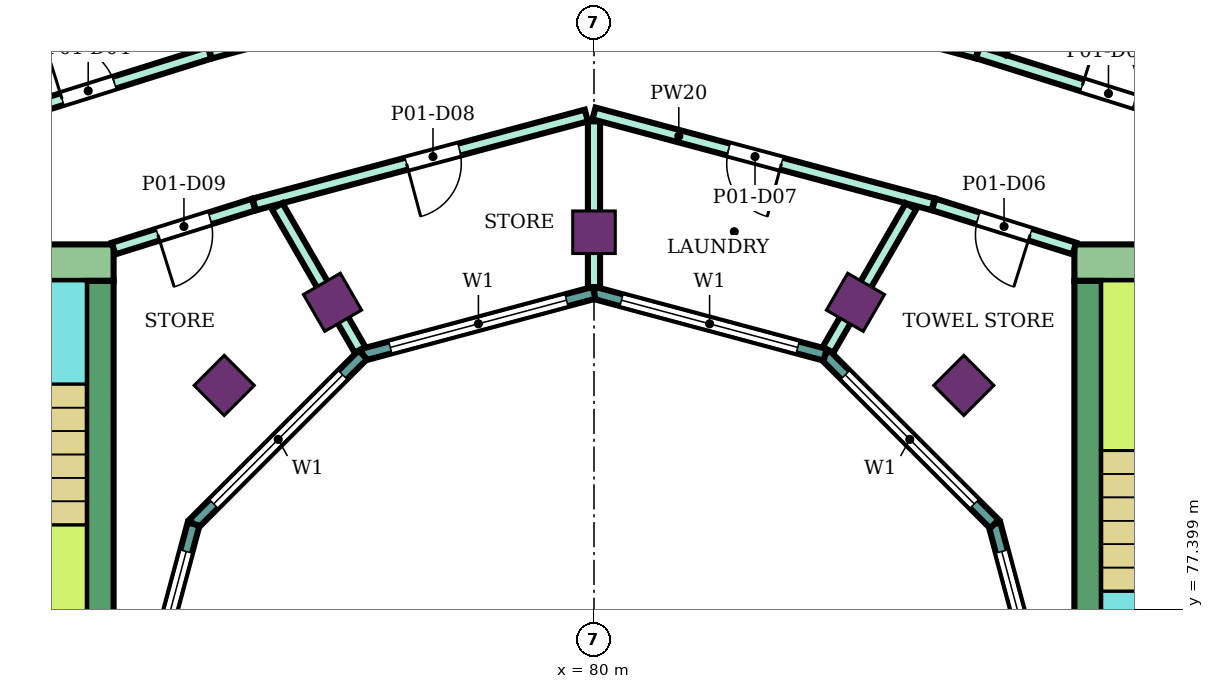
"""IFC4 building model, lengths in metres.
Left out: names, types, materials, properties, quantities, classifications, styles, units other than length and angle.
Written with IfcOpenShell. Run it as: python <this file> out.ifc"""

import sys

from ifc_helpers import new_model, si_unit, direction, frame, frame_2d, origin, origin_2d, place, context, subcontext, project, spatial, rectangle, extrude, element, fill, save


model = new_model("IFC4")
c1 = context("Model", 3, precision=1e-05, world=origin(), true_north=direction((0.0, 1.0)))
c2 = subcontext(c1, "Body", "Model", "MODEL_VIEW")
j1 = project(units=[si_unit("LENGTHUNIT", "METRE"), si_unit("PLANEANGLEUNIT", "RADIAN")], contexts=[c1])
p1 = place(None, origin())
s1 = spatial("IfcSite", under=j1, at=p1, CompositionType="ELEMENT")
p2 = place(p1, origin())
s2 = spatial("IfcBuilding", under=s1, at=p2, CompositionType="ELEMENT")
p3 = place(p2, frame((0.0, 0.0, 270.9)))
s3 = spatial("IfcBuildingStorey", under=s2, at=p3, CompositionType="ELEMENT", Elevation=270.9)
for number, where, z_axis, x_axis in (
    (1, (86.081, 81.081, 0.0), (0.0, 0.0, 1.0), (0.707, 0.707, 0.0)),
    (2, (84.3, 82.448, 0.0), (0.0, 0.0, 1.0), (0.5, 0.866, 0.0)),
    (3, (80.0, 83.6, 0.0), (0.0, 0.0, 1.0), (0.0, 1.0, 0.0)),
    (4, (75.7, 82.448, 0.0), (0.0, 0.0, 1.0), (-0.5, 0.866, 0.0)),
    (5, (73.919, 81.081, 0.0), (0.0, 0.0, 1.0), (-0.707, 0.707, 0.0)),
):
    element("IfcColumn", number, at=place(p3, frame(where, z_axis=z_axis, x_axis=x_axis)), inside=s3, PredefinedType="COLUMN", context=c2, shape_type="SweptSolid", body=[
        extrude(rectangle(XDim=0.7, YDim=0.7, at=origin_2d()), origin(), (0.0, 0.0, 1.0), 4.8),
    ])
p4 = place(p3, frame((87.9, 83.1, 0.0), z_axis=(0.0, 0.0, 1.0), x_axis=(1.0, 0.0, 0.0)))
e6 = element("IfcWall", 6, at=p4, inside=s3, PredefinedType="SHEAR", context=c2, shape_type="SweptSolid", body=[
    extrude(rectangle(XDim=14.9, YDim=0.6, at=frame_2d((7.45, 0.0))), origin(), (0.0, 0.0, 1.0), 4.48),
])
p5 = place(p4, frame((4.2, 0.0, 0.0)))
e7 = element("IfcOpeningElement", 7, at=p5, cuts=e6, PredefinedType="OPENING", context=c2, shape_type="SweptSolid", body=[
    extrude(rectangle(XDim=2.4, YDim=2.4, at=frame_2d((1.2, 1.2))), frame((0.0, 0.31, 0.0), z_axis=(0.0, -1.0, 0.0), x_axis=(1.0, 0.0, 0.0)), (0.0, 0.0, 1.0), 0.62),
])
p6 = place(p3, frame((88.125, 75.0, 0.0), z_axis=(0.0, 0.0, 1.0), x_axis=(0.0, 1.0, 0.0)))
e8 = element("IfcWall", 8, at=p6, inside=s3, PredefinedType="SHEAR", context=c2, shape_type="SweptSolid", body=[
    extrude(rectangle(XDim=7.8, YDim=0.45, at=frame_2d((3.9, 0.0))), origin(), (0.0, 0.0, 1.0), 4.48),
])
p7 = place(p3, frame((72.1, 83.1, 0.0), z_axis=(0.0, 0.0, 1.0), x_axis=(-1.0, 0.0, 0.0)))
e9 = element("IfcWall", 9, at=p7, inside=s3, PredefinedType="SHEAR", context=c2, shape_type="SweptSolid", body=[
    extrude(rectangle(XDim=14.9, YDim=0.6, at=frame_2d((7.45, 0.0))), origin(), (0.0, 0.0, 1.0), 4.48),
])
p8 = place(p7, frame((4.2, 0.0, 0.0)))
e10 = element("IfcOpeningElement", 10, at=p8, cuts=e9, PredefinedType="OPENING", context=c2, shape_type="SweptSolid", body=[
    extrude(rectangle(XDim=2.4, YDim=2.4, at=frame_2d((1.2, 1.2))), frame((0.0, 0.31, 0.0), z_axis=(0.0, -1.0, 0.0), x_axis=(1.0, 0.0, 0.0)), (0.0, 0.0, 1.0), 0.62),
])
p9 = place(p3, frame((71.875, 82.8, 0.0), z_axis=(0.0, 0.0, 1.0), x_axis=(0.0, -1.0, 0.0)))
e11 = element("IfcWall", 11, at=p9, inside=s3, PredefinedType="SHEAR", context=c2, shape_type="SweptSolid", body=[
    extrude(rectangle(XDim=7.8, YDim=0.45, at=frame_2d((3.9, 0.0))), origin(), (0.0, 0.0, 1.0), 4.48),
])
p10 = place(p3, frame((87.604, 75.0, 0.0), z_axis=(0.0, 0.0, 1.0), x_axis=(-0.258789828301, 0.965933654434, 0.0)))
e12 = element("IfcWall", 12, at=p10, inside=s3, PredefinedType="NOTDEFINED", context=c2, shape_type="SweptSolid", body=[
    extrude(rectangle(XDim=3.936, YDim=0.2, at=frame_2d((1.968, 0.0))), origin(), (0.0, 0.0, 1.0), 4.8),
])
p11 = place(p10, frame((0.468, 0.0, 0.9)))
e13 = element("IfcOpeningElement", 13, at=p11, cuts=e12, PredefinedType="OPENING", context=c2, shape_type="SweptSolid", body=[
    extrude(rectangle(XDim=3.0, YDim=2.3, at=frame_2d((1.5, 1.15))), frame((0.0, 0.11, 0.0), z_axis=(0.0, -1.0, 0.0), x_axis=(1.0, 0.0, 0.0)), (0.0, 0.0, 1.0), 0.22),
])
p12 = place(p3, frame((86.585, 78.802, 0.0), z_axis=(0.0, 0.0, 1.0), x_axis=(-0.707106781187, 0.707106781187, 0.0)))
e14 = element("IfcWall", 14, at=p12, inside=s3, PredefinedType="NOTDEFINED", context=c2, shape_type="SweptSolid", body=[
    extrude(rectangle(XDim=3.936, YDim=0.2, at=frame_2d((1.968, 0.0))), origin(), (0.0, 0.0, 1.0), 4.8),
])
p13 = place(p12, frame((0.468, 0.0, 0.9)))
e15 = element("IfcOpeningElement", 15, at=p13, cuts=e14, PredefinedType="OPENING", context=c2, shape_type="SweptSolid", body=[
    extrude(rectangle(XDim=3.0, YDim=2.3, at=frame_2d((1.5, 1.15))), frame((0.0, 0.11, 0.0), z_axis=(0.0, -1.0, 0.0), x_axis=(1.0, 0.0, 0.0)), (0.0, 0.0, 1.0), 0.22),
])
p14 = place(p3, frame((83.802, 81.585, 0.0), z_axis=(0.0, 0.0, 1.0), x_axis=(-0.965933654434, 0.258789828301, 0.0)))
e16 = element("IfcWall", 16, at=p14, inside=s3, PredefinedType="NOTDEFINED", context=c2, shape_type="SweptSolid", body=[
    extrude(rectangle(XDim=3.936, YDim=0.2, at=frame_2d((1.968, 0.0))), origin(), (0.0, 0.0, 1.0), 4.8),
])
p15 = place(p14, frame((0.468, 0.0, 0.9)))
e17 = element("IfcOpeningElement", 17, at=p15, cuts=e16, PredefinedType="OPENING", context=c2, shape_type="SweptSolid", body=[
    extrude(rectangle(XDim=3.0, YDim=2.3, at=frame_2d((1.5, 1.15))), frame((0.0, 0.11, 0.0), z_axis=(0.0, -1.0, 0.0), x_axis=(1.0, 0.0, 0.0)), (0.0, 0.0, 1.0), 0.22),
])
p16 = place(p3, frame((80.0, 82.604, 0.0), z_axis=(0.0, 0.0, 1.0), x_axis=(-0.965933654434, -0.258789828301, 0.0)))
e18 = element("IfcWall", 18, at=p16, inside=s3, PredefinedType="NOTDEFINED", context=c2, shape_type="SweptSolid", body=[
    extrude(rectangle(XDim=3.936, YDim=0.2, at=frame_2d((1.968, 0.0))), origin(), (0.0, 0.0, 1.0), 4.8),
])
p17 = place(p16, frame((0.468, 0.0, 0.9)))
e19 = element("IfcOpeningElement", 19, at=p17, cuts=e18, PredefinedType="OPENING", context=c2, shape_type="SweptSolid", body=[
    extrude(rectangle(XDim=3.0, YDim=2.3, at=frame_2d((1.5, 1.15))), frame((0.0, 0.11, 0.0), z_axis=(0.0, -1.0, 0.0), x_axis=(1.0, 0.0, 0.0)), (0.0, 0.0, 1.0), 0.22),
])
p18 = place(p3, frame((76.198, 81.585, 0.0), z_axis=(0.0, 0.0, 1.0), x_axis=(-0.707106781187, -0.707106781187, 0.0)))
e20 = element("IfcWall", 20, at=p18, inside=s3, PredefinedType="NOTDEFINED", context=c2, shape_type="SweptSolid", body=[
    extrude(rectangle(XDim=3.936, YDim=0.2, at=frame_2d((1.968, 0.0))), origin(), (0.0, 0.0, 1.0), 4.8),
])
p19 = place(p18, frame((0.468, 0.0, 0.9)))
e21 = element("IfcOpeningElement", 21, at=p19, cuts=e20, PredefinedType="OPENING", context=c2, shape_type="SweptSolid", body=[
    extrude(rectangle(XDim=3.0, YDim=2.3, at=frame_2d((1.5, 1.15))), frame((0.0, 0.11, 0.0), z_axis=(0.0, -1.0, 0.0), x_axis=(1.0, 0.0, 0.0)), (0.0, 0.0, 1.0), 0.22),
])
p20 = place(p3, frame((73.415, 78.802, 0.0), z_axis=(0.0, 0.0, 1.0), x_axis=(-0.258789828301, -0.965933654434, 0.0)))
e22 = element("IfcWall", 22, at=p20, inside=s3, PredefinedType="NOTDEFINED", context=c2, shape_type="SweptSolid", body=[
    extrude(rectangle(XDim=3.936, YDim=0.2, at=frame_2d((1.968, 0.0))), origin(), (0.0, 0.0, 1.0), 4.8),
])
p21 = place(p20, frame((0.468, 0.0, 0.9)))
e23 = element("IfcOpeningElement", 23, at=p21, cuts=e22, PredefinedType="OPENING", context=c2, shape_type="SweptSolid", body=[
    extrude(rectangle(XDim=3.0, YDim=2.3, at=frame_2d((1.5, 1.15))), frame((0.0, 0.11, 0.0), z_axis=(0.0, -1.0, 0.0), x_axis=(1.0, 0.0, 0.0)), (0.0, 0.0, 1.0), 0.22),
])
p22 = place(p3, frame((68.201, 84.833, 0.0), z_axis=(0.0, 0.0, 1.0), x_axis=(0.95420102455, 0.299166182492, 0.0)))
e24 = element("IfcWall", 24, at=p22, inside=s3, PredefinedType="PARTITIONING", context=c2, shape_type="SweptSolid", body=[
    extrude(rectangle(XDim=5.74, YDim=0.2, at=frame_2d((2.87, 0.0))), origin(), (0.0, 0.0, 1.0), 4.35),
])
p23 = place(p22, frame((3.198, 0.0, 0.0)))
e25 = element("IfcOpeningElement", 25, at=p23, cuts=e24, PredefinedType="OPENING", context=c2, shape_type="SweptSolid", body=[
    extrude(rectangle(XDim=0.9, YDim=2.1, at=frame_2d((0.45, 1.05))), frame((0.0, 0.11, 0.0), z_axis=(0.0, -1.0, 0.0), x_axis=(1.0, 0.0, 0.0)), (0.0, 0.0, 1.0), 0.22),
])
p24 = place(p3, frame((72.1, 83.332, 0.0), z_axis=(0.0, 0.0, 1.0), x_axis=(0.954233106619, 0.299063836383, 0.0)))
e26 = element("IfcWall", 26, at=p24, inside=s3, PredefinedType="PARTITIONING", context=c2, shape_type="SweptSolid", body=[
    extrude(rectangle(XDim=2.414, YDim=0.2, at=frame_2d((1.207, 0.0))), origin(), (0.0, 0.0, 1.0), 4.35),
])
p25 = place(p24, frame((0.762, 0.0, 0.0)))
e27 = element("IfcOpeningElement", 27, at=p25, cuts=e26, PredefinedType="OPENING", context=c2, shape_type="SweptSolid", body=[
    extrude(rectangle(XDim=0.9, YDim=2.1, at=frame_2d((0.45, 1.05))), frame((0.0, 0.11, 0.0), z_axis=(0.0, -1.0, 0.0), x_axis=(1.0, 0.0, 0.0)), (0.0, 0.0, 1.0), 0.22),
])
p26 = place(p3, frame((73.687, 86.554, 0.0), z_axis=(0.0, 0.0, 1.0), x_axis=(0.965933770452, 0.258789395263, 0.0)))
e28 = element("IfcWall", 28, at=p26, inside=s3, PredefinedType="PARTITIONING", context=c2, shape_type="SweptSolid", body=[
    extrude(rectangle(XDim=6.486, YDim=0.2, at=frame_2d((3.243, 0.0))), origin(), (0.0, 0.0, 1.0), 4.35),
])
p27 = place(p3, frame((74.413, 84.057, 0.0), z_axis=(0.0, 0.0, 1.0), x_axis=(0.965972135939, 0.258646153246, 0.0)))
e29 = element("IfcWall", 29, at=p27, inside=s3, PredefinedType="PARTITIONING", context=c2, shape_type="SweptSolid", body=[
    extrude(rectangle(XDim=5.654, YDim=0.2, at=frame_2d((2.827, 0.0))), origin(), (0.0, 0.0, 1.0), 4.35),
])
p28 = place(p27, frame((2.593, 0.0, 0.0)))
e30 = element("IfcOpeningElement", 30, at=p28, cuts=e29, PredefinedType="OPENING", context=c2, shape_type="SweptSolid", body=[
    extrude(rectangle(XDim=0.9, YDim=2.1, at=frame_2d((0.45, 1.05))), frame((0.0, 0.11, 0.0), z_axis=(0.0, -1.0, 0.0), x_axis=(1.0, 0.0, 0.0)), (0.0, 0.0, 1.0), 0.22),
])
p29 = place(p3, frame((74.79, 84.028, 0.0), z_axis=(0.0, 0.0, 1.0), x_axis=(0.499905962189, -0.866079689733, 0.0)))
e31 = element("IfcWall", 31, at=p29, inside=s3, PredefinedType="PARTITIONING", context=c2, shape_type="SweptSolid", body=[
    extrude(rectangle(XDim=2.726, YDim=0.2, at=frame_2d((1.363, 0.0))), origin(), (0.0, 0.0, 1.0), 4.35),
])
p30 = place(p3, frame((80.0, 82.699, 0.0), z_axis=(0.0, 0.0, 1.0), x_axis=(0.0, 1.0, 0.0)))
e32 = element("IfcWall", 32, at=p30, inside=s3, PredefinedType="PARTITIONING", context=c2, shape_type="SweptSolid", body=[
    extrude(rectangle(XDim=2.725, YDim=0.2, at=frame_2d((1.363, 0.0))), origin(), (0.0, 0.0, 1.0), 4.35),
])
p31 = place(p3, frame((80.0, 85.554, 0.0), z_axis=(0.0, 0.0, 1.0), x_axis=(0.965928989968, -0.258807237802, 0.0)))
e33 = element("IfcWall", 33, at=p31, inside=s3, PredefinedType="PARTITIONING", context=c2, shape_type="SweptSolid", body=[
    extrude(rectangle(XDim=5.774, YDim=0.2, at=frame_2d((2.887, 0.0))), origin(), (0.0, 0.0, 1.0), 4.35),
])
p32 = place(p31, frame((2.292, 0.0, 0.0)))
e34 = element("IfcOpeningElement", 34, at=p32, cuts=e33, PredefinedType="OPENING", context=c2, shape_type="SweptSolid", body=[
    extrude(rectangle(XDim=0.9, YDim=2.1, at=frame_2d((0.45, 1.05))), frame((0.0, 0.11, 0.0), z_axis=(0.0, -1.0, 0.0), x_axis=(1.0, 0.0, 0.0)), (0.0, 0.0, 1.0), 0.22),
])
p33 = place(p3, frame((80.0, 88.246, 0.0), z_axis=(0.0, 0.0, 1.0), x_axis=(0.965856994925, -0.259075790752, 0.0)))
e35 = element("IfcWall", 35, at=p33, inside=s3, PredefinedType="PARTITIONING", context=c2, shape_type="SweptSolid", body=[
    extrude(rectangle(XDim=6.526, YDim=0.2, at=frame_2d((3.263, 0.0))), origin(), (0.0, 0.0, 1.0), 4.35),
])
p34 = place(p33, frame((2.368, 0.0, 0.0)))
e36 = element("IfcOpeningElement", 36, at=p34, cuts=e35, PredefinedType="OPENING", context=c2, shape_type="SweptSolid", body=[
    extrude(rectangle(XDim=1.8, YDim=2.1, at=frame_2d((0.9, 1.05))), frame((0.0, 0.11, 0.0), z_axis=(0.0, -1.0, 0.0), x_axis=(1.0, 0.0, 0.0)), (0.0, 0.0, 1.0), 0.22),
])
p35 = place(p3, frame((83.85, 81.667, 0.0), z_axis=(0.0, 0.0, 1.0), x_axis=(0.500079107518, 0.86597972622, 0.0)))
e37 = element("IfcWall", 37, at=p35, inside=s3, PredefinedType="PARTITIONING", context=c2, shape_type="SweptSolid", body=[
    extrude(rectangle(XDim=2.726, YDim=0.2, at=frame_2d((1.363, 0.0))), origin(), (0.0, 0.0, 1.0), 4.35),
])
p36 = place(p3, frame((85.587, 84.057, 0.0), z_axis=(0.0, 0.0, 1.0), x_axis=(0.954239513179, -0.299043393987, 0.0)))
e38 = element("IfcWall", 38, at=p36, inside=s3, PredefinedType="PARTITIONING", context=c2, shape_type="SweptSolid", body=[
    extrude(rectangle(XDim=2.424, YDim=0.2, at=frame_2d((1.212, 0.0))), origin(), (0.0, 0.0, 1.0), 4.35),
])
p37 = place(p36, frame((0.762, 0.0, 0.0)))
e39 = element("IfcOpeningElement", 39, at=p37, cuts=e38, PredefinedType="OPENING", context=c2, shape_type="SweptSolid", body=[
    extrude(rectangle(XDim=0.9, YDim=2.1, at=frame_2d((0.45, 1.05))), frame((0.0, 0.11, 0.0), z_axis=(0.0, -1.0, 0.0), x_axis=(1.0, 0.0, 0.0)), (0.0, 0.0, 1.0), 0.22),
])
p38 = place(p3, frame((86.314, 86.556, 0.0), z_axis=(0.0, 0.0, 1.0), x_axis=(0.953912400139, -0.300085209334, 0.0)))
e40 = element("IfcWall", 40, at=p38, inside=s3, PredefinedType="PARTITIONING", context=c2, shape_type="SweptSolid", body=[
    extrude(rectangle(XDim=5.719, YDim=0.2, at=frame_2d((2.86, 0.0))), origin(), (0.0, 0.0, 1.0), 4.35),
])
p39 = place(p38, frame((1.801, 0.0, 0.0)))
e41 = element("IfcOpeningElement", 41, at=p39, cuts=e40, PredefinedType="OPENING", context=c2, shape_type="SweptSolid", body=[
    extrude(rectangle(XDim=0.9, YDim=2.1, at=frame_2d((0.45, 1.05))), frame((0.0, 0.11, 0.0), z_axis=(0.0, -1.0, 0.0), x_axis=(1.0, 0.0, 0.0)), (0.0, 0.0, 1.0), 0.22),
])
p40 = place(p3, frame((86.677, 86.563, 0.0), z_axis=(0.0, 0.0, 1.0), x_axis=(0.500143584568, 0.865942489324, 0.0)))
e42 = element("IfcWall", 42, at=p40, inside=s3, PredefinedType="PARTITIONING", context=c2, shape_type="SweptSolid", body=[
    extrude(rectangle(XDim=12.445, YDim=0.2, at=frame_2d((6.222, 0.0))), origin(), (0.0, 0.0, 1.0), 2.88),
])
p41 = place(p11, origin())
e43 = element("IfcWindow", 43, at=p41, inside=s3, PartitioningType="SINGLE_PANEL", PredefinedType="WINDOW", context=c2, shape_type="SweptSolid", body=[
    extrude(rectangle(XDim=3.0, YDim=2.3, at=frame_2d((1.5, 1.15))), frame((0.0, 0.03, 0.0), z_axis=(0.0, -1.0, 0.0), x_axis=(1.0, 0.0, 0.0)), (0.0, 0.0, 1.0), 0.06),
])
fill(e13, e43)
p42 = place(p13, origin())
e44 = element("IfcWindow", 44, at=p42, inside=s3, PartitioningType="SINGLE_PANEL", PredefinedType="WINDOW", context=c2, shape_type="SweptSolid", body=[
    extrude(rectangle(XDim=3.0, YDim=2.3, at=frame_2d((1.5, 1.15))), frame((0.0, 0.03, 0.0), z_axis=(0.0, -1.0, 0.0), x_axis=(1.0, 0.0, 0.0)), (0.0, 0.0, 1.0), 0.06),
])
fill(e15, e44)
p43 = place(p15, origin())
e45 = element("IfcWindow", 45, at=p43, inside=s3, PartitioningType="SINGLE_PANEL", PredefinedType="WINDOW", context=c2, shape_type="SweptSolid", body=[
    extrude(rectangle(XDim=3.0, YDim=2.3, at=frame_2d((1.5, 1.15))), frame((0.0, 0.03, 0.0), z_axis=(0.0, -1.0, 0.0), x_axis=(1.0, 0.0, 0.0)), (0.0, 0.0, 1.0), 0.06),
])
fill(e17, e45)
p44 = place(p17, origin())
e46 = element("IfcWindow", 46, at=p44, inside=s3, PartitioningType="SINGLE_PANEL", PredefinedType="WINDOW", context=c2, shape_type="SweptSolid", body=[
    extrude(rectangle(XDim=3.0, YDim=2.3, at=frame_2d((1.5, 1.15))), frame((0.0, 0.03, 0.0), z_axis=(0.0, -1.0, 0.0), x_axis=(1.0, 0.0, 0.0)), (0.0, 0.0, 1.0), 0.06),
])
fill(e19, e46)
p45 = place(p19, origin())
e47 = element("IfcWindow", 47, at=p45, inside=s3, PartitioningType="SINGLE_PANEL", PredefinedType="WINDOW", context=c2, shape_type="SweptSolid", body=[
    extrude(rectangle(XDim=3.0, YDim=2.3, at=frame_2d((1.5, 1.15))), frame((0.0, 0.03, 0.0), z_axis=(0.0, -1.0, 0.0), x_axis=(1.0, 0.0, 0.0)), (0.0, 0.0, 1.0), 0.06),
])
fill(e21, e47)
p46 = place(p21, origin())
e48 = element("IfcWindow", 48, at=p46, inside=s3, PartitioningType="SINGLE_PANEL", PredefinedType="WINDOW", context=c2, shape_type="SweptSolid", body=[
    extrude(rectangle(XDim=3.0, YDim=2.3, at=frame_2d((1.5, 1.15))), frame((0.0, 0.03, 0.0), z_axis=(0.0, -1.0, 0.0), x_axis=(1.0, 0.0, 0.0)), (0.0, 0.0, 1.0), 0.06),
])
fill(e23, e48)
p47 = place(p39, origin())
e49 = element("IfcDoor", 49, at=p47, inside=s3, OperationType="SINGLE_SWING_LEFT", PredefinedType="DOOR", context=c2, shape_type="SweptSolid", body=[
    extrude(rectangle(XDim=0.9, YDim=2.1, at=frame_2d((0.45, 1.05))), frame((0.0, 0.025, 0.0), z_axis=(0.0, -1.0, 0.0), x_axis=(1.0, 0.0, 0.0)), (0.0, 0.0, 1.0), 0.05),
])
fill(e41, e49)
p48 = place(p23, origin())
e50 = element("IfcDoor", 50, at=p48, inside=s3, OperationType="SINGLE_SWING_LEFT", PredefinedType="DOOR", context=c2, shape_type="SweptSolid", body=[
    extrude(rectangle(XDim=0.9, YDim=2.1, at=frame_2d((0.45, 1.05))), frame((0.0, 0.025, 0.0), z_axis=(0.0, -1.0, 0.0), x_axis=(1.0, 0.0, 0.0)), (0.0, 0.0, 1.0), 0.05),
])
fill(e25, e50)
p49 = place(p37, frame((0.9, 0.0, 0.0), z_axis=(0.0, 0.0, 1.0), x_axis=(-1.0, 0.0, 0.0)))
e51 = element("IfcDoor", 51, at=p49, inside=s3, OperationType="SINGLE_SWING_LEFT", PredefinedType="DOOR", context=c2, shape_type="SweptSolid", body=[
    extrude(rectangle(XDim=0.9, YDim=2.1, at=frame_2d((0.45, 1.05))), frame((0.0, 0.025, 0.0), z_axis=(0.0, -1.0, 0.0), x_axis=(1.0, 0.0, 0.0)), (0.0, 0.0, 1.0), 0.05),
])
fill(e39, e51)
p50 = place(p32, frame((0.9, 0.0, 0.0), z_axis=(0.0, 0.0, 1.0), x_axis=(-1.0, 0.0, 0.0)))
e52 = element("IfcDoor", 52, at=p50, inside=s3, OperationType="SINGLE_SWING_LEFT", PredefinedType="DOOR", context=c2, shape_type="SweptSolid", body=[
    extrude(rectangle(XDim=0.9, YDim=2.1, at=frame_2d((0.45, 1.05))), frame((0.0, 0.025, 0.0), z_axis=(0.0, -1.0, 0.0), x_axis=(1.0, 0.0, 0.0)), (0.0, 0.0, 1.0), 0.05),
])
fill(e34, e52)
p51 = place(p28, frame((0.9, 0.0, 0.0), z_axis=(0.0, 0.0, 1.0), x_axis=(-1.0, 0.0, 0.0)))
e53 = element("IfcDoor", 53, at=p51, inside=s3, OperationType="SINGLE_SWING_RIGHT", PredefinedType="DOOR", context=c2, shape_type="SweptSolid", body=[
    extrude(rectangle(XDim=0.9, YDim=2.1, at=frame_2d((0.45, 1.05))), frame((0.0, 0.025, 0.0), z_axis=(0.0, -1.0, 0.0), x_axis=(1.0, 0.0, 0.0)), (0.0, 0.0, 1.0), 0.05),
])
fill(e30, e53)
p52 = place(p25, frame((0.9, 0.0, 0.0), z_axis=(0.0, 0.0, 1.0), x_axis=(-1.0, 0.0, 0.0)))
e54 = element("IfcDoor", 54, at=p52, inside=s3, OperationType="SINGLE_SWING_RIGHT", PredefinedType="DOOR", context=c2, shape_type="SweptSolid", body=[
    extrude(rectangle(XDim=0.9, YDim=2.1, at=frame_2d((0.45, 1.05))), frame((0.0, 0.025, 0.0), z_axis=(0.0, -1.0, 0.0), x_axis=(1.0, 0.0, 0.0)), (0.0, 0.0, 1.0), 0.05),
])
fill(e27, e54)
save(model, sys.argv[1])
